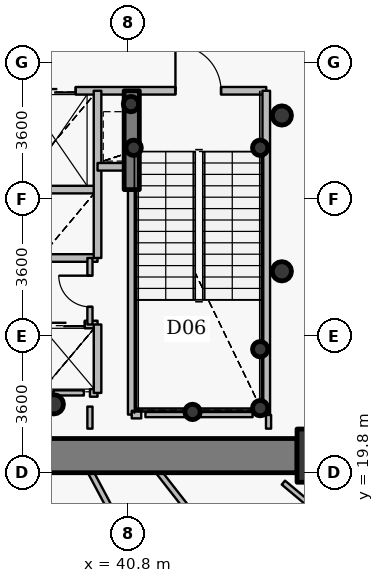
"""IFC4 building model, lengths in metres.
Left out: names, types, materials, properties, quantities, classifications, styles, units other than length and angle.
Written with IfcOpenShell. Run it as: python <this file> out.ifc"""

import sys

from ifc_helpers import new_model, si_unit, direction, frame, frame_2d, origin, origin_2d, place, context, subcontext, project, spatial, rectangle, hollow_circle, extrude, source, transform, mapped, element, fill, save


model = new_model("IFC4")
c1 = context("Model", 3, precision=1e-05, world=origin(), true_north=direction((0.0, 1.0)))
c2 = subcontext(c1, "Body", "Model", "MODEL_VIEW")
j1 = project(units=[si_unit("LENGTHUNIT", "METRE"), si_unit("PLANEANGLEUNIT", "RADIAN")], contexts=[c1])
p1 = place(None, origin())
s1 = spatial("IfcSite", under=j1, at=p1, CompositionType="ELEMENT")
p2 = place(p1, origin())
s2 = spatial("IfcBuilding", under=s1, at=p2, CompositionType="ELEMENT")
p3 = place(p2, frame((0.0, 0.0, 53.4)))
s3 = spatial("IfcBuildingStorey", under=s2, at=p3, CompositionType="ELEMENT", Elevation=53.4)
p4 = place(p3, frame((45.95, 20.25, 0.0), z_axis=(0.0, 0.0, 1.0), x_axis=(1.0, 0.0, 0.0)))
e1 = element("IfcColumn", 1, at=p4, inside=s3, PredefinedType="COLUMN", context=c2, shape_type="SweptSolid", body=[
    extrude(rectangle(XDim=1.4, YDim=1.4, at=origin_2d()), origin(), (0.0, 0.0, 1.0), 4.2),
])
p5 = place(p3, frame((38.85, 21.6, 0.0), z_axis=(0.0, 0.0, 1.0), x_axis=(1.0, 0.0, 0.0)))
e2 = element("IfcColumn", 2, at=p5, inside=s3, PredefinedType="COLUMN", context=c2, shape_type="SweptSolid", body=[
    extrude(hollow_circle(Radius=0.254, WallThickness=0.02, at=origin_2d()), origin(), (0.0, 0.0, 1.0), 4.2),
])
for number, where, z_axis, x_axis in (
    (3, (44.28, 21.5, 0.0), (0.0, 0.0, 1.0), (1.0, 0.0, 0.0)),
    (4, (44.28, 23.05, 0.0), (0.0, 0.0, 1.0), (1.0, 0.0, 0.0)),
    (5, (42.5, 21.4, 0.0), (0.0, 0.0, 1.0), (1.0, 0.0, 0.0)),
    (6, (40.95, 28.35, 0.0), (0.0, 0.0, 1.0), (1.0, 0.0, 0.0)),
    (7, (44.28, 28.35, 0.0), (0.0, 0.0, 1.0), (1.0, 0.0, 0.0)),
    (8, (40.88, 29.5, 0.0), (0.0, 0.0, 1.0), (1.0, 0.0, 0.0)),
):
    element("IfcColumn", number, at=place(p3, frame(where, z_axis=z_axis, x_axis=x_axis)), inside=s3, PredefinedType="COLUMN", context=c2, shape_type="SweptSolid", body=[
        extrude(hollow_circle(Radius=0.203, WallThickness=0.016, at=origin_2d()), origin(), (0.0, 0.0, 1.0), 4.2),
    ])
p6 = place(p3, frame((45.25, 20.25, 0.0), z_axis=(0.0, 0.0, 1.0), x_axis=(-1.0, 0.0, 0.0)))
e9 = element("IfcWall", 9, at=p6, inside=s3, PredefinedType="SHEAR", context=c2, shape_type="SweptSolid", body=[
    extrude(rectangle(XDim=18.5, YDim=0.9, at=frame_2d((9.25, 0.0))), origin(), (0.0, 0.0, 1.0), 3.4),
])
p7 = place(p6, frame((10.0, 0.0, 0.0)))
e10 = element("IfcOpeningElement", 10, at=p7, cuts=e9, PredefinedType="OPENING", context=c2, shape_type="SweptSolid", body=[
    extrude(rectangle(XDim=1.15, YDim=2.15, at=origin_2d()), frame((0.575, 0.46, 1.075), z_axis=(0.0, -1.0, 0.0), x_axis=(1.0, 0.0, 0.0)), (0.0, 0.0, 1.0), 0.92),
])
p8 = place(p3, frame((40.9, 27.25, 0.0), z_axis=(0.0, 0.0, 1.0), x_axis=(0.0, 1.0, 0.0)))
e11 = element("IfcWall", 11, at=p8, inside=s3, PredefinedType="SHEAR", context=c2, shape_type="SweptSolid", body=[
    extrude(rectangle(XDim=2.6, YDim=0.4, at=frame_2d((1.3, 0.0))), origin(), (0.0, 0.0, 1.0), 3.55),
])
for number, where, z_axis, x_axis in (
    (12, (44.85, 25.1, 0.0), (0.0, 0.0, 1.0), (1.0, 0.0, 0.0)),
    (13, (44.85, 29.2, 0.0), (0.0, 0.0, 1.0), (1.0, 0.0, 0.0)),
):
    element("IfcColumn", number, at=place(p3, frame(where, z_axis=z_axis, x_axis=x_axis)), inside=s3, PredefinedType="COLUMN", context=c2, shape_type="SweptSolid", body=[
        extrude(hollow_circle(Radius=0.254, WallThickness=0.02, at=origin_2d()), origin(), (0.0, 0.0, 1.0), 4.2),
    ])
p9 = place(p3, frame((35.05, 27.25, 0.0), z_axis=(0.0, 0.0, 1.0), x_axis=(1.0, 0.0, 0.0)))
e14 = element("IfcWall", 14, at=p9, inside=s3, PredefinedType="PARTITIONING", context=c2, shape_type="SweptSolid", body=[
    extrude(rectangle(XDim=4.95, YDim=0.2, at=frame_2d((2.475, 0.0))), origin(), (0.0, 0.0, 1.0), 3.535),
])
p10 = place(p3, frame((35.45, 23.7, 0.0), z_axis=(0.0, 0.0, 1.0), x_axis=(1.0, 0.0, 0.0)))
e15 = element("IfcWall", 15, at=p10, inside=s3, PredefinedType="PARTITIONING", context=c2, shape_type="SweptSolid", body=[
    extrude(rectangle(XDim=4.55, YDim=0.2, at=frame_2d((2.275, 0.0))), origin(), (0.0, 0.0, 1.0), 3.535),
])
p11 = place(p10, frame((0.25, 0.0, 0.0)))
e16 = element("IfcOpeningElement", 16, at=p11, cuts=e15, PredefinedType="OPENING", context=c2, shape_type="SweptSolid", body=[
    extrude(rectangle(XDim=1.05, YDim=2.15, at=origin_2d()), frame((0.525, 0.11, 1.075), z_axis=(0.0, -1.0, 0.0), x_axis=(1.0, 0.0, 0.0)), (0.0, 0.0, 1.0), 0.22),
])
p12 = place(p10, frame((1.745, 0.0, 0.0)))
e17 = element("IfcOpeningElement", 17, at=p12, cuts=e15, PredefinedType="OPENING", context=c2, shape_type="SweptSolid", body=[
    extrude(rectangle(XDim=1.05, YDim=2.15, at=origin_2d()), frame((0.525, 0.11, 1.075), z_axis=(0.0, -1.0, 0.0), x_axis=(1.0, 0.0, 0.0)), (0.0, 0.0, 1.0), 0.22),
])
p13 = place(p10, frame((3.165, 0.0, 0.0)))
e18 = element("IfcOpeningElement", 18, at=p13, cuts=e15, PredefinedType="OPENING", context=c2, shape_type="SweptSolid", body=[
    extrude(rectangle(XDim=1.05, YDim=2.15, at=origin_2d()), frame((0.525, 0.11, 1.075), z_axis=(0.0, -1.0, 0.0), x_axis=(1.0, 0.0, 0.0)), (0.0, 0.0, 1.0), 0.22),
])
p14 = place(p3, frame((35.45, 25.45, 0.0), z_axis=(0.0, 0.0, 1.0), x_axis=(1.0, 0.0, 0.0)))
e19 = element("IfcWall", 19, at=p14, inside=s3, PredefinedType="PARTITIONING", context=c2, shape_type="SweptSolid", body=[
    extrude(rectangle(XDim=4.55, YDim=0.2, at=frame_2d((2.275, 0.0))), origin(), (0.0, 0.0, 1.0), 3.535),
])
p15 = place(p3, frame((35.95, 29.85, 0.0), z_axis=(0.0, 0.0, 1.0), x_axis=(1.0, 0.0, 0.0)))
e20 = element("IfcWall", 20, at=p15, inside=s3, PredefinedType="PARTITIONING", context=c2, shape_type="SweptSolid", body=[
    extrude(rectangle(XDim=8.49, YDim=0.2, at=frame_2d((4.245, 0.0))), origin(), (0.0, 0.0, 1.0), 3.535),
])
p16 = place(p15, frame((6.1, 0.0, 0.0)))
e21 = element("IfcOpeningElement", 21, at=p16, cuts=e20, PredefinedType="OPENING", context=c2, shape_type="SweptSolid", body=[
    extrude(rectangle(XDim=1.2, YDim=2.15, at=origin_2d()), frame((0.6, 0.11, 1.075), z_axis=(0.0, -1.0, 0.0), x_axis=(1.0, 0.0, 0.0)), (0.0, 0.0, 1.0), 0.22),
])
p17 = place(p15, frame((0.37, 0.0, 0.0)))
e22 = element("IfcOpeningElement", 22, at=p17, cuts=e20, PredefinedType="OPENING", context=c2, shape_type="SweptSolid", body=[
    extrude(rectangle(XDim=1.15, YDim=2.15, at=origin_2d()), frame((0.575, 0.11, 1.075), z_axis=(0.0, -1.0, 0.0), x_axis=(1.0, 0.0, 0.0)), (0.0, 0.0, 1.0), 0.22),
])
p18 = place(p15, frame((2.425, 0.0, 0.0)))
e23 = element("IfcOpeningElement", 23, at=p18, cuts=e20, PredefinedType="OPENING", context=c2, shape_type="SweptSolid", body=[
    extrude(rectangle(XDim=1.05, YDim=2.15, at=origin_2d()), frame((0.525, 0.11, 1.075), z_axis=(0.0, -1.0, 0.0), x_axis=(1.0, 0.0, 0.0)), (0.0, 0.0, 1.0), 0.22),
])
p19 = place(p3, frame((39.8, 21.9, 0.0), z_axis=(0.0, 0.0, 1.0), x_axis=(1.0, 0.0, 0.0)))
e24 = element("IfcWall", 24, at=p19, inside=s3, PredefinedType="PARTITIONING", context=c2, shape_type="SweptSolid", body=[
    extrude(rectangle(XDim=0.2, YDim=0.2, at=frame_2d((0.1, 0.0))), origin(), (0.0, 0.0, 1.0), 3.95),
])
p20 = place(p3, frame((39.8, 23.7, 0.0), z_axis=(0.0, 0.0, 1.0), x_axis=(0.0, 1.0, 0.0)))
e25 = element("IfcWall", 25, at=p20, inside=s3, PredefinedType="PARTITIONING", context=c2, shape_type="SweptSolid", body=[
    extrude(rectangle(XDim=1.75, YDim=0.135, at=frame_2d((0.875, 0.0))), origin(), (0.0, 0.0, 1.0), 3.95),
])
p21 = place(p20, frame((0.465, 0.0, 0.0)))
e26 = element("IfcOpeningElement", 26, at=p21, cuts=e25, PredefinedType="OPENING", context=c2, shape_type="SweptSolid", body=[
    extrude(rectangle(XDim=0.82, YDim=2.1, at=origin_2d()), frame((0.41, 0.078, 1.05), z_axis=(0.0, -1.0, 0.0), x_axis=(1.0, 0.0, 0.0)), (0.0, 0.0, 1.0), 0.155),
])
p22 = place(p3, frame((39.828, 19.8, 0.0), z_axis=(0.0, 0.0, 1.0), x_axis=(0.469475400737, -0.882945552174, 0.0)))
e27 = element("IfcWall", 27, at=p22, inside=s3, PredefinedType="PARTITIONING", context=c2, shape_type="SweptSolid", body=[
    extrude(rectangle(XDim=17.188, YDim=0.15, at=frame_2d((8.594, 0.0))), origin(), (0.0, 0.0, 1.0), 3.335),
])
p23 = place(p22, frame((8.069, 0.0, 0.0)))
e28 = element("IfcOpeningElement", 28, at=p23, cuts=e27, PredefinedType="OPENING", context=c2, shape_type="SweptSolid", body=[
    extrude(rectangle(XDim=1.05, YDim=2.15, at=origin_2d()), frame((0.525, 0.085, 1.075), z_axis=(0.0, -1.0, 0.0), x_axis=(1.0, 0.0, 0.0)), (0.0, 0.0, 1.0), 0.17),
])
p24 = place(p3, frame((40.0, 21.9, 0.0), z_axis=(0.0, 0.0, 1.0), x_axis=(0.0, 1.0, 0.0)))
e29 = element("IfcWall", 29, at=p24, inside=s3, PredefinedType="PARTITIONING", context=c2, shape_type="SweptSolid", body=[
    extrude(rectangle(XDim=1.8, YDim=0.2, at=frame_2d((0.9, 0.0))), origin(), (0.0, 0.0, 1.0), 3.95),
])
p25 = place(p3, frame((40.0, 25.45, 0.0), z_axis=(0.0, 0.0, 1.0), x_axis=(0.0, 1.0, 0.0)))
e30 = element("IfcWall", 30, at=p25, inside=s3, PredefinedType="PARTITIONING", context=c2, shape_type="SweptSolid", body=[
    extrude(rectangle(XDim=4.4, YDim=0.2, at=frame_2d((2.2, 0.0))), origin(), (0.0, 0.0, 1.0), 3.95),
])
p26 = place(p3, frame((40.0, 27.85, 0.0), z_axis=(0.0, 0.0, 1.0), x_axis=(1.0, 0.0, 0.0)))
e31 = element("IfcWall", 31, at=p26, inside=s3, PredefinedType="PARTITIONING", context=c2, shape_type="SweptSolid", body=[
    extrude(rectangle(XDim=0.9, YDim=0.2, at=frame_2d((0.45, 0.0))), origin(), (0.0, 0.0, 1.0), 3.95),
])
p27 = place(p3, frame((40.9, 21.33, 0.0), z_axis=(0.0, 0.0, 1.0), x_axis=(0.0, 1.0, 0.0)))
e32 = element("IfcWall", 32, at=p27, inside=s3, PredefinedType="PARTITIONING", context=c2, shape_type="SweptSolid", body=[
    extrude(rectangle(XDim=5.91, YDim=0.2, at=frame_2d((2.955, 0.0))), origin(), (0.0, 0.0, 1.0), 3.485),
])
p28 = place(p3, frame((40.9, 21.33, 0.0), z_axis=(0.0, 0.0, 1.0), x_axis=(1.0, 0.0, 0.0)))
e33 = element("IfcWall", 33, at=p28, inside=s3, PredefinedType="PARTITIONING", context=c2, shape_type="SweptSolid", body=[
    extrude(rectangle(XDim=0.25, YDim=0.2, at=frame_2d((0.125, 0.0))), origin(), (0.0, 0.0, 1.0), 3.485),
])
p29 = place(p3, frame((41.625, 19.8, 0.0), z_axis=(0.0, 0.0, 1.0), x_axis=(0.615654567116, -0.788016150843, 0.0)))
e34 = element("IfcWall", 34, at=p29, inside=s3, PredefinedType="PARTITIONING", context=c2, shape_type="SweptSolid", body=[
    extrude(rectangle(XDim=17.105, YDim=0.15, at=frame_2d((8.552, 0.0))), origin(), (0.0, 0.0, 1.0), 3.335),
])
p30 = place(p3, frame((44.44, 21.33, 0.0), z_axis=(0.0, 0.0, 1.0), x_axis=(0.0, 1.0, 0.0)))
e35 = element("IfcWall", 35, at=p30, inside=s3, PredefinedType="PARTITIONING", context=c2, shape_type="SweptSolid", body=[
    extrude(rectangle(XDim=8.52, YDim=0.2, at=frame_2d((4.26, 0.0))), origin(), (0.0, 0.0, 1.0), 3.95),
])
p31 = place(p3, frame((44.08, 21.33, 0.0), z_axis=(0.0, 0.0, 1.0), x_axis=(-1.0, 0.0, 0.0)))
e36 = element("IfcWall", 36, at=p31, inside=s3, PredefinedType="PARTITIONING", context=c2, shape_type="SweptSolid", body=[
    extrude(rectangle(XDim=2.82, YDim=0.135, at=frame_2d((1.41, 0.0))), origin(), (0.0, 0.0, 1.0), 3.485),
])
p32 = place(p3, frame((39.64, 21.9, 0.0), z_axis=(0.0, 0.0, 1.0), x_axis=(-1.0, 0.0, 0.0)))
e37 = element("IfcWall", 37, at=p32, inside=s3, PredefinedType="PARTITIONING", context=c2, shape_type="SweptSolid", body=[
    extrude(rectangle(XDim=0.8, YDim=0.135, at=frame_2d((0.4, 0.0))), origin(), (0.0, 0.0, 1.0), 3.535),
])
p33 = place(p3, frame((39.8, 20.96, 0.0), z_axis=(0.0, 0.0, 1.0), x_axis=(0.0, 1.0, 0.0)))
e38 = element("IfcWall", 38, at=p33, inside=s3, PredefinedType="PARTITIONING", context=c2, shape_type="SweptSolid", body=[
    extrude(rectangle(XDim=0.58, YDim=0.135, at=frame_2d((0.29, 0.0))), origin(), (0.0, 0.0, 1.0), 3.485),
])
p34 = place(p3, frame((44.5, 20.96, 0.0), z_axis=(0.0, 0.0, 1.0), x_axis=(0.0, 1.0, 0.0)))
e39 = element("IfcWall", 39, at=p34, inside=s3, PredefinedType="PARTITIONING", context=c2, shape_type="SweptSolid", body=[
    extrude(rectangle(XDim=0.36, YDim=0.135, at=frame_2d((0.18, 0.0))), origin(), (0.0, 0.0, 1.0), 3.95),
])
p35 = place(p3, frame((44.89, 19.54, 0.0), z_axis=(0.0, 0.0, 1.0), x_axis=(0.76598583339, -0.642857451576, 0.0)))
e40 = element("IfcWall", 40, at=p35, inside=s3, PredefinedType="PARTITIONING", context=c2, shape_type="SweptSolid", body=[
    extrude(rectangle(XDim=1.112, YDim=0.135, at=frame_2d((0.556, 0.0))), origin(), (0.0, 0.0, 1.0), 3.95),
])
m1 = source(origin(), c2, "Body", "SweptSolid", [
    extrude(rectangle(XDim=1.2, YDim=2.15, at=origin_2d()), frame((0.6, 0.025, 1.075), z_axis=(0.0, -1.0, 0.0), x_axis=(1.0, 0.0, 0.0)), (0.0, 0.0, 1.0), 0.05),
])
p36 = place(p16, origin())
e41 = element("IfcDoor", 41, at=p36, inside=s3, OperationType="SINGLE_SWING_LEFT", PredefinedType="DOOR", context=c2, shape_type="MappedRepresentation", body=[
    mapped(m1, transform((0.0, 0.0, 0.0), x_axis=(1.0, 0.0, 0.0), y_axis=(0.0, 1.0, 0.0), z_axis=(0.0, 0.0, 1.0), scale=1.0)),
])
fill(e21, e41)
m2 = source(origin(), c2, "Body", "SweptSolid", [
    extrude(rectangle(XDim=1.05, YDim=2.15, at=origin_2d()), frame((0.525, 0.025, 1.075), z_axis=(0.0, -1.0, 0.0), x_axis=(1.0, 0.0, 0.0)), (0.0, 0.0, 1.0), 0.05),
])
p37 = place(p18, origin())
e42 = element("IfcDoor", 42, at=p37, inside=s3, OperationType="DOUBLE_DOOR_SLIDING", PredefinedType="USERDEFINED", context=c2, shape_type="MappedRepresentation", body=[
    mapped(m2, transform((0.0, 0.0, 0.0), x_axis=(1.0, 0.0, 0.0), y_axis=(0.0, 1.0, 0.0), z_axis=(0.0, 0.0, 1.0), scale=1.0)),
])
fill(e23, e42)
p38 = place(p13, origin())
e43 = element("IfcDoor", 43, at=p38, inside=s3, OperationType="DOUBLE_DOOR_SLIDING", PredefinedType="USERDEFINED", context=c2, shape_type="MappedRepresentation", body=[
    mapped(m2, transform((0.0, 0.0, 0.0), x_axis=(1.0, 0.0, 0.0), y_axis=(0.0, 1.0, 0.0), z_axis=(0.0, 0.0, 1.0), scale=1.0)),
])
fill(e18, e43)
m3 = source(origin(), c2, "Body", "SweptSolid", [
    extrude(rectangle(XDim=0.82, YDim=2.1, at=origin_2d()), frame((0.41, 0.025, 1.05), z_axis=(0.0, -1.0, 0.0), x_axis=(1.0, 0.0, 0.0)), (0.0, 0.0, 1.0), 0.05),
])
p39 = place(p21, origin())
e44 = element("IfcDoor", 44, at=p39, inside=s3, OperationType="SINGLE_SWING_RIGHT", PredefinedType="DOOR", context=c2, shape_type="MappedRepresentation", body=[
    mapped(m3, transform((0.0, 0.0, 0.0), x_axis=(1.0, 0.0, 0.0), y_axis=(0.0, 1.0, 0.0), z_axis=(0.0, 0.0, 1.0), scale=1.0)),
])
fill(e26, e44)
save(model, sys.argv[1])
